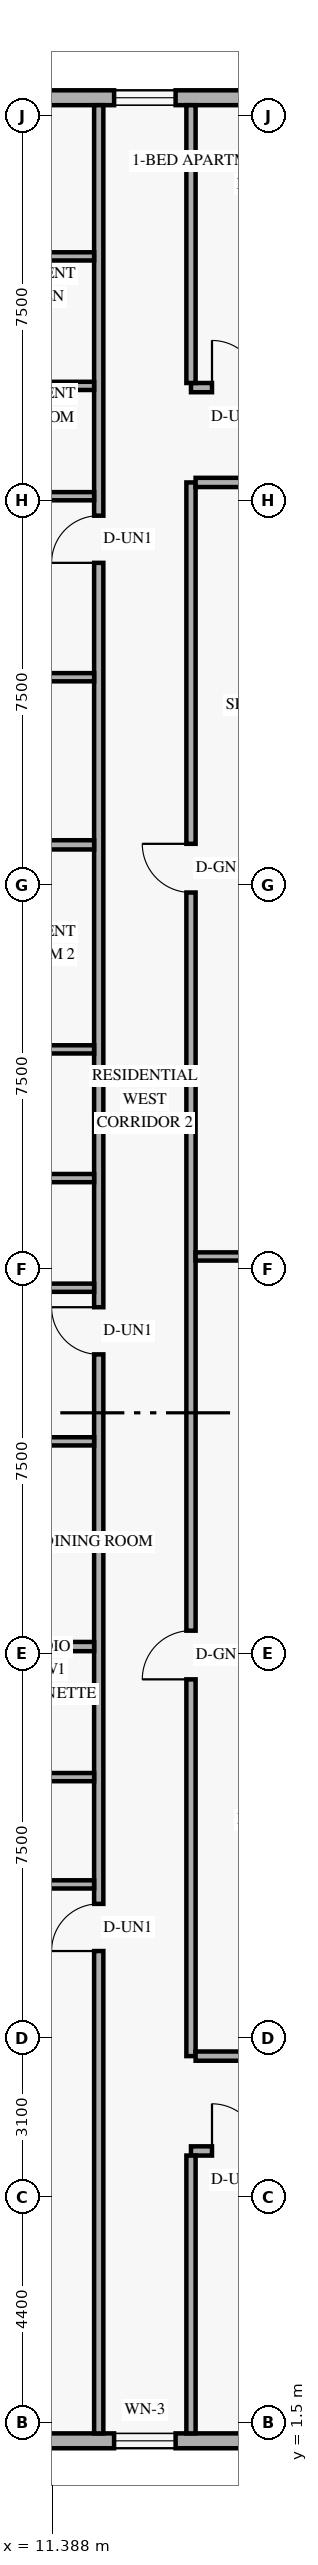
"""IFC4 building model, lengths in metres.
Left out: names, types, materials, properties, quantities, classifications, styles, units other than length and angle.
Written with IfcOpenShell. Run it as: python <this file> out.ifc"""

import sys

from ifc_helpers import new_model, si_unit, direction, frame, frame_2d, origin, place, context, subcontext, project, spatial, rectangle, extrude, element, fill, save


model = new_model("IFC4")
c1 = context("Model", 3, precision=1e-05, world=origin(), true_north=direction((0.0, 1.0)))
c2 = subcontext(c1, "Body", "Model", "MODEL_VIEW")
j1 = project(units=[si_unit("LENGTHUNIT", "METRE"), si_unit("PLANEANGLEUNIT", "RADIAN")], contexts=[c1])
p1 = place(None, origin())
s1 = spatial("IfcSite", under=j1, at=p1, CompositionType="ELEMENT")
p2 = place(p1, origin())
s2 = spatial("IfcBuilding", under=s1, at=p2, CompositionType="ELEMENT")
p3 = place(p2, frame((0.0, 0.0, 27.6)))
s3 = spatial("IfcBuildingStorey", under=s2, at=p3, CompositionType="ELEMENT", Elevation=27.6)
p4 = place(p3, frame((5.42, 1.145, 0.0), z_axis=(0.0, 0.0, 1.0), x_axis=(1.0, 0.0, 0.0)))
e1 = element("IfcWall", 1, at=p4, inside=s3, PredefinedType="SOLIDWALL", context=c2, shape_type="SweptSolid", body=[
    extrude(rectangle(XDim=39.56, YDim=0.29, at=frame_2d((19.78, 0.0))), origin(), (0.0, 0.0, 1.0), 3.36),
])
p5 = place(p4, frame((2.84, 0.0, 0.85)))
e2 = element("IfcOpeningElement", 2, at=p5, cuts=e1, PredefinedType="OPENING", context=c2, shape_type="SweptSolid", body=[
    extrude(rectangle(XDim=1.2, YDim=1.5, at=frame_2d((0.6, 0.75))), frame((0.0, 0.155, 0.0), z_axis=(0.0, -1.0, 0.0), x_axis=(1.0, 0.0, 0.0)), (0.0, 0.0, 1.0), 0.31),
])
p6 = place(p4, frame((7.18, 0.0, 0.85)))
e3 = element("IfcOpeningElement", 3, at=p6, cuts=e1, PredefinedType="OPENING", context=c2, shape_type="SweptSolid", body=[
    extrude(rectangle(XDim=1.2, YDim=1.5, at=frame_2d((0.6, 0.75))), frame((0.0, 0.155, 0.0), z_axis=(0.0, -1.0, 0.0), x_axis=(1.0, 0.0, 0.0)), (0.0, 0.0, 1.0), 0.31),
])
p7 = place(p4, frame((11.245, 0.0, 0.85)))
e4 = element("IfcOpeningElement", 4, at=p7, cuts=e1, PredefinedType="OPENING", context=c2, shape_type="SweptSolid", body=[
    extrude(rectangle(XDim=1.2, YDim=1.5, at=frame_2d((0.6, 0.75))), frame((0.0, 0.155, 0.0), z_axis=(0.0, -1.0, 0.0), x_axis=(1.0, 0.0, 0.0)), (0.0, 0.0, 1.0), 0.31),
])
p8 = place(p4, frame((16.48, 0.0, 0.85)))
e5 = element("IfcOpeningElement", 5, at=p8, cuts=e1, PredefinedType="OPENING", context=c2, shape_type="SweptSolid", body=[
    extrude(rectangle(XDim=1.2, YDim=1.5, at=frame_2d((0.6, 0.75))), frame((0.0, 0.155, 0.0), z_axis=(0.0, -1.0, 0.0), x_axis=(1.0, 0.0, 0.0)), (0.0, 0.0, 1.0), 0.31),
])
p9 = place(p4, frame((21.905, 0.0, 0.85)))
e6 = element("IfcOpeningElement", 6, at=p9, cuts=e1, PredefinedType="OPENING", context=c2, shape_type="SweptSolid", body=[
    extrude(rectangle(XDim=1.2, YDim=1.5, at=frame_2d((0.6, 0.75))), frame((0.0, 0.155, 0.0), z_axis=(0.0, -1.0, 0.0), x_axis=(1.0, 0.0, 0.0)), (0.0, 0.0, 1.0), 0.31),
])
p10 = place(p4, frame((27.33, 0.0, 0.85)))
e7 = element("IfcOpeningElement", 7, at=p10, cuts=e1, PredefinedType="OPENING", context=c2, shape_type="SweptSolid", body=[
    extrude(rectangle(XDim=1.2, YDim=1.5, at=frame_2d((0.6, 0.75))), frame((0.0, 0.155, 0.0), z_axis=(0.0, -1.0, 0.0), x_axis=(1.0, 0.0, 0.0)), (0.0, 0.0, 1.0), 0.31),
])
p11 = place(p4, frame((30.465, 0.0, 0.85)))
e8 = element("IfcOpeningElement", 8, at=p11, cuts=e1, PredefinedType="OPENING", context=c2, shape_type="SweptSolid", body=[
    extrude(rectangle(XDim=1.2, YDim=1.5, at=frame_2d((0.6, 0.75))), frame((0.0, 0.155, 0.0), z_axis=(0.0, -1.0, 0.0), x_axis=(1.0, 0.0, 0.0)), (0.0, 0.0, 1.0), 0.31),
])
p12 = place(p4, frame((35.245, 0.0, 0.85)))
e9 = element("IfcOpeningElement", 9, at=p12, cuts=e1, PredefinedType="OPENING", context=c2, shape_type="SweptSolid", body=[
    extrude(rectangle(XDim=1.2, YDim=1.5, at=frame_2d((0.6, 0.75))), frame((0.0, 0.155, 0.0), z_axis=(0.0, -1.0, 0.0), x_axis=(1.0, 0.0, 0.0)), (0.0, 0.0, 1.0), 0.31),
])
p13 = place(p3, frame((44.98, 46.855, 0.0), z_axis=(0.0, 0.0, 1.0), x_axis=(-1.0, 0.0, 0.0)))
e10 = element("IfcWall", 10, at=p13, inside=s3, PredefinedType="SOLIDWALL", context=c2, shape_type="SweptSolid", body=[
    extrude(rectangle(XDim=39.56, YDim=0.29, at=frame_2d((19.78, 0.0))), origin(), (0.0, 0.0, 1.0), 3.36),
])
p14 = place(p13, frame((35.52, 0.0, 0.85)))
e11 = element("IfcOpeningElement", 11, at=p14, cuts=e10, PredefinedType="OPENING", context=c2, shape_type="SweptSolid", body=[
    extrude(rectangle(XDim=1.2, YDim=1.5, at=frame_2d((0.6, 0.75))), frame((0.0, 0.155, 0.0), z_axis=(0.0, -1.0, 0.0), x_axis=(1.0, 0.0, 0.0)), (0.0, 0.0, 1.0), 0.31),
])
p15 = place(p13, frame((31.18, 0.0, 0.85)))
e12 = element("IfcOpeningElement", 12, at=p15, cuts=e10, PredefinedType="OPENING", context=c2, shape_type="SweptSolid", body=[
    extrude(rectangle(XDim=1.2, YDim=1.5, at=frame_2d((0.6, 0.75))), frame((0.0, 0.155, 0.0), z_axis=(0.0, -1.0, 0.0), x_axis=(1.0, 0.0, 0.0)), (0.0, 0.0, 1.0), 0.31),
])
p16 = place(p13, frame((26.925, 0.0, 0.85)))
e13 = element("IfcOpeningElement", 13, at=p16, cuts=e10, PredefinedType="OPENING", context=c2, shape_type="SweptSolid", body=[
    extrude(rectangle(XDim=1.2, YDim=1.5, at=frame_2d((0.6, 0.75))), frame((0.0, 0.155, 0.0), z_axis=(0.0, -1.0, 0.0), x_axis=(1.0, 0.0, 0.0)), (0.0, 0.0, 1.0), 0.31),
])
p17 = place(p13, frame((21.5, 0.0, 0.85)))
e14 = element("IfcOpeningElement", 14, at=p17, cuts=e10, PredefinedType="OPENING", context=c2, shape_type="SweptSolid", body=[
    extrude(rectangle(XDim=1.2, YDim=1.5, at=frame_2d((0.6, 0.75))), frame((0.0, 0.155, 0.0), z_axis=(0.0, -1.0, 0.0), x_axis=(1.0, 0.0, 0.0)), (0.0, 0.0, 1.0), 0.31),
])
p18 = place(p13, frame((16.265, 0.0, 0.85)))
e15 = element("IfcOpeningElement", 15, at=p18, cuts=e10, PredefinedType="OPENING", context=c2, shape_type="SweptSolid", body=[
    extrude(rectangle(XDim=1.2, YDim=1.5, at=frame_2d((0.6, 0.75))), frame((0.0, 0.155, 0.0), z_axis=(0.0, -1.0, 0.0), x_axis=(1.0, 0.0, 0.0)), (0.0, 0.0, 1.0), 0.31),
])
p19 = place(p13, frame((11.03, 0.0, 0.85)))
e16 = element("IfcOpeningElement", 16, at=p19, cuts=e10, PredefinedType="OPENING", context=c2, shape_type="SweptSolid", body=[
    extrude(rectangle(XDim=1.2, YDim=1.5, at=frame_2d((0.6, 0.75))), frame((0.0, 0.155, 0.0), z_axis=(0.0, -1.0, 0.0), x_axis=(1.0, 0.0, 0.0)), (0.0, 0.0, 1.0), 0.31),
])
p20 = place(p13, frame((7.895, 0.0, 0.85)))
e17 = element("IfcOpeningElement", 17, at=p20, cuts=e10, PredefinedType="OPENING", context=c2, shape_type="SweptSolid", body=[
    extrude(rectangle(XDim=1.2, YDim=1.5, at=frame_2d((0.6, 0.75))), frame((0.0, 0.155, 0.0), z_axis=(0.0, -1.0, 0.0), x_axis=(1.0, 0.0, 0.0)), (0.0, 0.0, 1.0), 0.31),
])
p21 = place(p13, frame((3.115, 0.0, 0.85)))
e18 = element("IfcOpeningElement", 18, at=p21, cuts=e10, PredefinedType="OPENING", context=c2, shape_type="SweptSolid", body=[
    extrude(rectangle(XDim=1.2, YDim=1.5, at=frame_2d((0.6, 0.75))), frame((0.0, 0.155, 0.0), z_axis=(0.0, -1.0, 0.0), x_axis=(1.0, 0.0, 0.0)), (0.0, 0.0, 1.0), 0.31),
])
p22 = place(p3, frame((14.1, 6.8, 0.0), z_axis=(0.0, 0.0, 1.0), x_axis=(1.0, 0.0, 0.0)))
e19 = element("IfcWall", 19, at=p22, inside=s3, PredefinedType="STANDARD", context=c2, shape_type="SweptSolid", body=[
    extrude(rectangle(XDim=21.32, YDim=0.18, at=frame_2d((10.66, 0.0))), origin(), (0.0, 0.0, 1.0), 2.649),
])
p23 = place(p22, frame((0.41, 0.0, 0.0)))
e20 = element("IfcOpeningElement", 20, at=p23, cuts=e19, PredefinedType="OPENING", context=c2, shape_type="SweptSolid", body=[
    extrude(rectangle(XDim=0.92, YDim=2.15, at=frame_2d((0.46, 1.075))), frame((0.0, 0.1, 0.0), z_axis=(0.0, -1.0, 0.0), x_axis=(1.0, 0.0, 0.0)), (0.0, 0.0, 1.0), 0.2),
])
p24 = place(p22, frame((10.88, 0.0, 0.0)))
e21 = element("IfcOpeningElement", 21, at=p24, cuts=e19, PredefinedType="OPENING", context=c2, shape_type="SweptSolid", body=[
    extrude(rectangle(XDim=0.92, YDim=2.15, at=frame_2d((0.46, 1.075))), frame((0.0, 0.1, 0.0), z_axis=(0.0, -1.0, 0.0), x_axis=(1.0, 0.0, 0.0)), (0.0, 0.0, 1.0), 0.2),
])
p25 = place(p3, frame((14.1, 41.2, 0.0), z_axis=(0.0, 0.0, 1.0), x_axis=(1.0, 0.0, 0.0)))
e22 = element("IfcWall", 22, at=p25, inside=s3, PredefinedType="STANDARD", context=c2, shape_type="SweptSolid", body=[
    extrude(rectangle(XDim=21.32, YDim=0.18, at=frame_2d((10.66, 0.0))), origin(), (0.0, 0.0, 1.0), 2.649),
])
p26 = place(p25, frame((0.41, 0.0, 0.0)))
e23 = element("IfcOpeningElement", 23, at=p26, cuts=e22, PredefinedType="OPENING", context=c2, shape_type="SweptSolid", body=[
    extrude(rectangle(XDim=0.92, YDim=2.15, at=frame_2d((0.46, 1.075))), frame((0.0, 0.1, 0.0), z_axis=(0.0, -1.0, 0.0), x_axis=(1.0, 0.0, 0.0)), (0.0, 0.0, 1.0), 0.2),
])
p27 = place(p25, frame((11.26, 0.0, 0.0)))
e24 = element("IfcOpeningElement", 24, at=p27, cuts=e22, PredefinedType="OPENING", context=c2, shape_type="SweptSolid", body=[
    extrude(rectangle(XDim=0.92, YDim=2.15, at=frame_2d((0.46, 1.075))), frame((0.0, 0.1, 0.0), z_axis=(0.0, -1.0, 0.0), x_axis=(1.0, 0.0, 0.0)), (0.0, 0.0, 1.0), 0.2),
])
p28 = place(p3, frame((12.3, 1.29, 0.0), z_axis=(0.0, 0.0, 1.0), x_axis=(0.0, 1.0, 0.0)))
e25 = element("IfcWall", 25, at=p28, inside=s3, PredefinedType="STANDARD", context=c2, shape_type="SweptSolid", body=[
    extrude(rectangle(XDim=45.42, YDim=0.18, at=frame_2d((22.71, 0.0))), origin(), (0.0, 0.0, 1.0), 2.649),
])
p29 = place(p28, frame((9.41, 0.0, 0.0)))
e26 = element("IfcOpeningElement", 26, at=p29, cuts=e25, PredefinedType="OPENING", context=c2, shape_type="SweptSolid", body=[
    extrude(rectangle(XDim=0.92, YDim=2.15, at=frame_2d((0.46, 1.075))), frame((0.0, 0.1, 0.0), z_axis=(0.0, -1.0, 0.0), x_axis=(1.0, 0.0, 0.0)), (0.0, 0.0, 1.0), 0.2),
])
p30 = place(p28, frame((21.05, 0.0, 0.0)))
e27 = element("IfcOpeningElement", 27, at=p30, cuts=e25, PredefinedType="OPENING", context=c2, shape_type="SweptSolid", body=[
    extrude(rectangle(XDim=0.92, YDim=2.15, at=frame_2d((0.46, 1.075))), frame((0.0, 0.1, 0.0), z_axis=(0.0, -1.0, 0.0), x_axis=(1.0, 0.0, 0.0)), (0.0, 0.0, 1.0), 0.2),
])
p31 = place(p28, frame((36.491, 0.0, 0.0)))
e28 = element("IfcOpeningElement", 28, at=p31, cuts=e25, PredefinedType="OPENING", context=c2, shape_type="SweptSolid", body=[
    extrude(rectangle(XDim=0.92, YDim=2.15, at=frame_2d((0.46, 1.075))), frame((0.0, 0.1, 0.0), z_axis=(0.0, -1.0, 0.0), x_axis=(1.0, 0.0, 0.0)), (0.0, 0.0, 1.0), 0.2),
])
p32 = place(p3, frame((14.1, 8.65, 0.0), z_axis=(0.0, 0.0, 1.0), x_axis=(0.0, 1.0, 0.0)))
e29 = element("IfcWall", 29, at=p32, inside=s3, PredefinedType="STANDARD", context=c2, shape_type="SweptSolid", body=[
    extrude(rectangle(XDim=30.7, YDim=0.18, at=frame_2d((15.35, 0.0))), origin(), (0.0, 0.0, 1.0), 2.649),
])
p33 = place(p32, frame((7.35, 0.0, 0.0)))
e30 = element("IfcOpeningElement", 30, at=p33, cuts=e29, PredefinedType="OPENING", context=c2, shape_type="SweptSolid", body=[
    extrude(rectangle(XDim=0.95, YDim=2.15, at=frame_2d((0.475, 1.075))), frame((0.0, 0.1, 0.0), z_axis=(0.0, -1.0, 0.0), x_axis=(1.0, 0.0, 0.0)), (0.0, 0.0, 1.0), 0.2),
])
p34 = place(p32, frame((22.7, 0.0, 0.0)))
e31 = element("IfcOpeningElement", 31, at=p34, cuts=e29, PredefinedType="OPENING", context=c2, shape_type="SweptSolid", body=[
    extrude(rectangle(XDim=0.95, YDim=2.15, at=frame_2d((0.475, 1.075))), frame((0.0, 0.1, 0.0), z_axis=(0.0, -1.0, 0.0), x_axis=(1.0, 0.0, 0.0)), (0.0, 0.0, 1.0), 0.2),
])
for number, where, z_axis, x_axis in (
    (32, (14.19, 8.65, 0.0), (0.0, 0.0, 1.0), (1.0, 0.0, 0.0)),
    (33, (14.19, 39.35, 0.0), (0.0, 0.0, 1.0), (1.0, 0.0, 0.0)),
):
    element("IfcWall", number, at=place(p3, frame(where, z_axis=z_axis, x_axis=x_axis)), inside=s3, PredefinedType="STANDARD", context=c2, shape_type="SweptSolid", body=[
        extrude(rectangle(XDim=7.37, YDim=0.18, at=frame_2d((3.685, 0.0))), origin(), (0.0, 0.0, 1.0), 2.649),
    ])
for number, where, z_axis, x_axis in (
    (34, (14.1, 1.29, 0.0), (0.0, 0.0, 1.0), (0.0, 1.0, 0.0)),
    (35, (14.1, 41.29, 0.0), (0.0, 0.0, 1.0), (0.0, 1.0, 0.0)),
):
    element("IfcWall", number, at=place(p3, frame(where, z_axis=z_axis, x_axis=x_axis)), inside=s3, PredefinedType="PARTITIONING", context=c2, shape_type="SweptSolid", body=[
        extrude(rectangle(XDim=5.42, YDim=0.18, at=frame_2d((2.71, 0.0))), origin(), (0.0, 0.0, 1.0), 2.809),
    ])
p35 = place(p3, frame((9.376, 12.0, 0.0), z_axis=(0.0, 0.0, 1.0), x_axis=(1.0, 0.0, 0.0)))
e36 = element("IfcWall", 36, at=p35, inside=s3, PredefinedType="PLUMBINGWALL", context=c2, shape_type="SweptSolid", body=[
    extrude(rectangle(XDim=2.834, YDim=0.16, at=frame_2d((1.417, 0.0))), origin(), (0.0, 0.0, 1.0), 2.649),
])
p36 = place(p3, frame((9.536, 14.093, 0.0), z_axis=(0.0, 0.0, 1.0), x_axis=(1.0, 0.0, 0.0)))
e37 = element("IfcWall", 37, at=p36, inside=s3, PredefinedType="PLUMBINGWALL", context=c2, shape_type="SweptSolid", body=[
    extrude(rectangle(XDim=2.674, YDim=0.16, at=frame_2d((1.337, 0.0))), origin(), (0.0, 0.0, 1.0), 2.649),
])
p37 = place(p3, frame((2.09, 16.64, 0.0), z_axis=(0.0, 0.0, 1.0), x_axis=(1.0, 0.0, 0.0)))
e38 = element("IfcWall", 38, at=p37, inside=s3, PredefinedType="PARTITIONING", context=c2, shape_type="SweptSolid", body=[
    extrude(rectangle(XDim=10.12, YDim=0.18, at=frame_2d((5.06, 0.0))), origin(), (0.0, 0.0, 1.0), 2.649),
])
p38 = place(p3, frame((2.09, 28.29, 0.0), z_axis=(0.0, 0.0, 1.0), x_axis=(1.0, 0.0, 0.0)))
e39 = element("IfcWall", 39, at=p38, inside=s3, PredefinedType="PARTITIONING", context=c2, shape_type="SweptSolid", body=[
    extrude(rectangle(XDim=10.12, YDim=0.16, at=frame_2d((5.06, 0.0))), origin(), (0.0, 0.0, 1.0), 2.649),
])
p39 = place(p38, frame((2.145, 0.0, 0.0)))
e40 = element("IfcOpeningElement", 40, at=p39, cuts=e39, PredefinedType="OPENING", context=c2, shape_type="SweptSolid", body=[
    extrude(rectangle(XDim=0.88, YDim=2.14, at=frame_2d((0.44, 1.07))), frame((0.0, 0.09, 0.0), z_axis=(0.0, -1.0, 0.0), x_axis=(1.0, 0.0, 0.0)), (0.0, 0.0, 1.0), 0.18),
])
p40 = place(p38, frame((6.035, 0.0, 0.0)))
e41 = element("IfcOpeningElement", 41, at=p40, cuts=e39, PredefinedType="OPENING", context=c2, shape_type="SweptSolid", body=[
    extrude(rectangle(XDim=0.88, YDim=2.14, at=frame_2d((0.44, 1.07))), frame((0.0, 0.09, 0.0), z_axis=(0.0, -1.0, 0.0), x_axis=(1.0, 0.0, 0.0)), (0.0, 0.0, 1.0), 0.18),
])
p41 = place(p3, frame((9.65, 23.64, 0.0), z_axis=(0.0, 0.0, 1.0), x_axis=(1.0, 0.0, 0.0)))
e42 = element("IfcWall", 42, at=p41, inside=s3, PredefinedType="PLUMBINGWALL", context=c2, shape_type="SweptSolid", body=[
    extrude(rectangle(XDim=2.56, YDim=0.16, at=frame_2d((1.28, 0.0))), origin(), (0.0, 0.0, 1.0), 2.649),
])
p42 = place(p3, frame((9.81, 25.779, 0.0), z_axis=(0.0, 0.0, 1.0), x_axis=(1.0, 0.0, 0.0)))
e43 = element("IfcWall", 43, at=p42, inside=s3, PredefinedType="PLUMBINGWALL", context=c2, shape_type="SweptSolid", body=[
    extrude(rectangle(XDim=2.4, YDim=0.16, at=frame_2d((1.2, 0.0))), origin(), (0.0, 0.0, 1.0), 2.649),
])
p43 = place(p3, frame((2.09, 20.643, 0.0), z_axis=(0.0, 0.0, 1.0), x_axis=(1.0, 0.0, 0.0)))
e44 = element("IfcWall", 44, at=p43, inside=s3, PredefinedType="PARTITIONING", context=c2, shape_type="SweptSolid", body=[
    extrude(rectangle(XDim=10.12, YDim=0.16, at=frame_2d((5.06, 0.0))), origin(), (0.0, 0.0, 1.0), 2.649),
])
p44 = place(p43, frame((4.51, 0.0, 0.0)))
e45 = element("IfcOpeningElement", 45, at=p44, cuts=e44, PredefinedType="OPENING", context=c2, shape_type="SweptSolid", body=[
    extrude(rectangle(XDim=0.95, YDim=2.15, at=frame_2d((0.475, 1.075))), frame((0.0, 0.09, 0.0), z_axis=(0.0, -1.0, 0.0), x_axis=(1.0, 0.0, 0.0)), (0.0, 0.0, 1.0), 0.18),
])
p45 = place(p3, frame((2.09, 32.28, 0.0), z_axis=(0.0, 0.0, 1.0), x_axis=(1.0, 0.0, 0.0)))
e46 = element("IfcWall", 46, at=p45, inside=s3, PredefinedType="PARTITIONING", context=c2, shape_type="SweptSolid", body=[
    extrude(rectangle(XDim=10.12, YDim=0.18, at=frame_2d((5.06, 0.0))), origin(), (0.0, 0.0, 1.0), 2.649),
])
p46 = place(p3, frame((2.162, 43.76, 0.0), z_axis=(0.0, 0.0, 1.0), x_axis=(1.0, 0.0, 0.0)))
e47 = element("IfcWall", 47, at=p46, inside=s3, PredefinedType="PARTITIONING", context=c2, shape_type="SweptSolid", body=[
    extrude(rectangle(XDim=10.048, YDim=0.16, at=frame_2d((5.024, 0.0))), origin(), (0.0, 0.0, 1.0), 3.36),
])
p47 = place(p46, frame((2.528, 0.0, 0.0)))
e48 = element("IfcOpeningElement", 48, at=p47, cuts=e47, PredefinedType="OPENING", context=c2, shape_type="SweptSolid", body=[
    extrude(rectangle(XDim=0.9, YDim=2.14, at=frame_2d((0.45, 1.07))), frame((0.0, 0.09, 0.0), z_axis=(0.0, -1.0, 0.0), x_axis=(1.0, 0.0, 0.0)), (0.0, 0.0, 1.0), 0.18),
])
p48 = place(p3, frame((8.43, 39.082, 0.0), z_axis=(0.0, 0.0, 1.0), x_axis=(1.0, 0.0, 0.0)))
e49 = element("IfcWall", 49, at=p48, inside=s3, PredefinedType="PLUMBINGWALL", context=c2, shape_type="SweptSolid", body=[
    extrude(rectangle(XDim=3.78, YDim=0.16, at=frame_2d((1.89, 0.0))), origin(), (0.0, 0.0, 1.0), 3.36),
])
p49 = place(p3, frame((8.59, 41.234, 0.0), z_axis=(0.0, 0.0, 1.0), x_axis=(1.0, 0.0, 0.0)))
e50 = element("IfcWall", 50, at=p49, inside=s3, PredefinedType="PLUMBINGWALL", context=c2, shape_type="SweptSolid", body=[
    extrude(rectangle(XDim=3.62, YDim=0.16, at=frame_2d((1.81, 0.0))), origin(), (0.0, 0.0, 1.0), 2.649),
])
p50 = place(p3, frame((2.09, 35.55, 0.0), z_axis=(0.0, 0.0, 1.0), x_axis=(1.0, 0.0, 0.0)))
e51 = element("IfcWall", 51, at=p50, inside=s3, PredefinedType="PARTITIONING", context=c2, shape_type="SweptSolid", body=[
    extrude(rectangle(XDim=10.12, YDim=0.16, at=frame_2d((5.06, 0.0))), origin(), (0.0, 0.0, 1.0), 2.649),
])
p51 = place(p50, frame((4.51, 0.0, 0.0)))
e52 = element("IfcOpeningElement", 52, at=p51, cuts=e51, PredefinedType="OPENING", context=c2, shape_type="SweptSolid", body=[
    extrude(rectangle(XDim=0.95, YDim=2.15, at=frame_2d((0.475, 1.075))), frame((0.0, 0.09, 0.0), z_axis=(0.0, -1.0, 0.0), x_axis=(1.0, 0.0, 0.0)), (0.0, 0.0, 1.0), 0.18),
])
p52 = place(p3, frame((14.19, 24.25, 0.0), z_axis=(0.0, 0.0, 1.0), x_axis=(1.0, 0.0, 0.0)))
e53 = element("IfcWall", 53, at=p52, inside=s3, PredefinedType="PARTITIONING", context=c2, shape_type="SweptSolid", body=[
    extrude(rectangle(XDim=7.37, YDim=0.16, at=frame_2d((3.685, 0.0))), origin(), (0.0, 0.0, 1.0), 2.649),
])
p53 = place(p6, origin())
e54 = element("IfcWindow", 54, at=p53, inside=s3, PartitioningType="SINGLE_PANEL", PredefinedType="WINDOW", context=c2, shape_type="SweptSolid", body=[
    extrude(rectangle(XDim=1.2, YDim=1.5, at=frame_2d((0.6, 0.75))), frame((0.0, 0.03, 0.0), z_axis=(0.0, -1.0, 0.0), x_axis=(1.0, 0.0, 0.0)), (0.0, 0.0, 1.0), 0.06),
])
fill(e3, e54)
p54 = place(p15, origin())
e55 = element("IfcWindow", 55, at=p54, inside=s3, PartitioningType="SINGLE_PANEL", PredefinedType="WINDOW", context=c2, shape_type="SweptSolid", body=[
    extrude(rectangle(XDim=1.2, YDim=1.5, at=frame_2d((0.6, 0.75))), frame((0.0, 0.03, 0.0), z_axis=(0.0, -1.0, 0.0), x_axis=(1.0, 0.0, 0.0)), (0.0, 0.0, 1.0), 0.06),
])
fill(e12, e55)
p55 = place(p29, origin())
e56 = element("IfcDoor", 56, at=p55, inside=s3, OperationType="SINGLE_SWING_LEFT", PredefinedType="DOOR", context=c2, shape_type="SweptSolid", body=[
    extrude(rectangle(XDim=0.92, YDim=2.15, at=frame_2d((0.46, 1.075))), frame((0.0, 0.025, 0.0), z_axis=(0.0, -1.0, 0.0), x_axis=(1.0, 0.0, 0.0)), (0.0, 0.0, 1.0), 0.05),
])
fill(e26, e56)
p56 = place(p30, origin())
e57 = element("IfcDoor", 57, at=p56, inside=s3, OperationType="SINGLE_SWING_RIGHT", PredefinedType="DOOR", context=c2, shape_type="SweptSolid", body=[
    extrude(rectangle(XDim=0.92, YDim=2.15, at=frame_2d((0.46, 1.075))), frame((0.0, 0.025, 0.0), z_axis=(0.0, -1.0, 0.0), x_axis=(1.0, 0.0, 0.0)), (0.0, 0.0, 1.0), 0.05),
])
fill(e27, e57)
p57 = place(p31, origin())
e58 = element("IfcDoor", 58, at=p57, inside=s3, OperationType="SINGLE_SWING_LEFT", PredefinedType="DOOR", context=c2, shape_type="SweptSolid", body=[
    extrude(rectangle(XDim=0.92, YDim=2.15, at=frame_2d((0.46, 1.075))), frame((0.0, 0.025, 0.0), z_axis=(0.0, -1.0, 0.0), x_axis=(1.0, 0.0, 0.0)), (0.0, 0.0, 1.0), 0.05),
])
fill(e28, e58)
p58 = place(p33, origin())
e59 = element("IfcDoor", 59, at=p58, inside=s3, OperationType="SINGLE_SWING_LEFT", PredefinedType="DOOR", context=c2, shape_type="SweptSolid", body=[
    extrude(rectangle(XDim=0.95, YDim=2.15, at=frame_2d((0.475, 1.075))), frame((0.0, 0.025, 0.0), z_axis=(0.0, -1.0, 0.0), x_axis=(1.0, 0.0, 0.0)), (0.0, 0.0, 1.0), 0.05),
])
fill(e30, e59)
p59 = place(p34, origin())
e60 = element("IfcDoor", 60, at=p59, inside=s3, OperationType="SINGLE_SWING_RIGHT", PredefinedType="DOOR", context=c2, shape_type="SweptSolid", body=[
    extrude(rectangle(XDim=0.95, YDim=2.15, at=frame_2d((0.475, 1.075))), frame((0.0, 0.025, 0.0), z_axis=(0.0, -1.0, 0.0), x_axis=(1.0, 0.0, 0.0)), (0.0, 0.0, 1.0), 0.05),
])
fill(e31, e60)
p60 = place(p23, origin())
e61 = element("IfcDoor", 61, at=p60, inside=s3, OperationType="SINGLE_SWING_LEFT", PredefinedType="DOOR", context=c2, shape_type="SweptSolid", body=[
    extrude(rectangle(XDim=0.92, YDim=2.15, at=frame_2d((0.46, 1.075))), frame((0.0, 0.025, 0.0), z_axis=(0.0, -1.0, 0.0), x_axis=(1.0, 0.0, 0.0)), (0.0, 0.0, 1.0), 0.05),
])
fill(e20, e61)
p61 = place(p26, origin())
e62 = element("IfcDoor", 62, at=p61, inside=s3, OperationType="SINGLE_SWING_LEFT", PredefinedType="DOOR", context=c2, shape_type="SweptSolid", body=[
    extrude(rectangle(XDim=0.92, YDim=2.15, at=frame_2d((0.46, 1.075))), frame((0.0, 0.025, 0.0), z_axis=(0.0, -1.0, 0.0), x_axis=(1.0, 0.0, 0.0)), (0.0, 0.0, 1.0), 0.05),
])
fill(e23, e62)
save(model, sys.argv[1])
